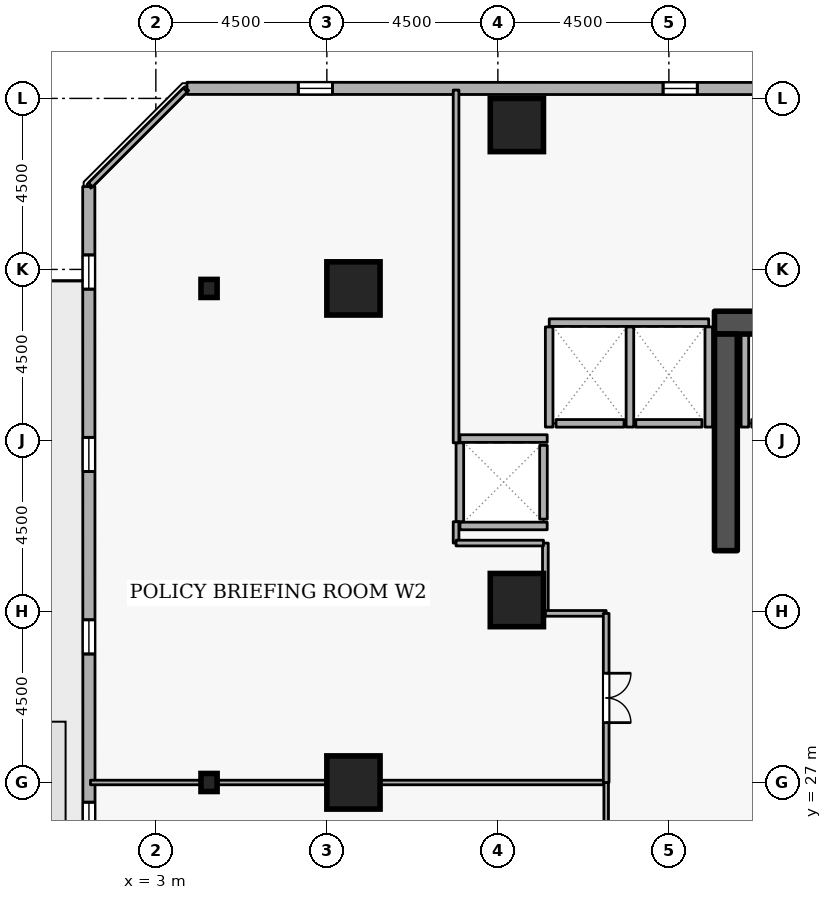
"""IFC4 building model, lengths in metres.
Left out: names, types, materials, properties, quantities, classifications, styles, units other than length and angle.
Written with IfcOpenShell. Run it as: python <this file> out.ifc"""

import sys

from ifc_helpers import new_model, si_unit, direction, frame, frame_2d, origin, origin_2d, place, context, subcontext, project, spatial, rectangle, i_section, extrude, element, fill, save


model = new_model("IFC4")
c1 = context("Model", 3, precision=1e-05, world=origin(), true_north=direction((0.0, 1.0)))
c2 = subcontext(c1, "Body", "Model", "MODEL_VIEW")
j1 = project(units=[si_unit("LENGTHUNIT", "METRE"), si_unit("PLANEANGLEUNIT", "RADIAN")], contexts=[c1])
p1 = place(None, origin())
s1 = spatial("IfcSite", under=j1, at=p1, CompositionType="ELEMENT")
p2 = place(p1, origin())
s2 = spatial("IfcBuilding", under=s1, at=p2, CompositionType="ELEMENT")
p3 = place(p2, frame((0.0, 0.0, 35.1)))
s3 = spatial("IfcBuildingStorey", under=s2, at=p3, CompositionType="ELEMENT", Elevation=35.1)
p4 = place(p3, frame((17.7, 39.1, 0.0), z_axis=(0.0, 0.0, 1.0), x_axis=(1.0, 0.0, 0.0)))
e1 = element("IfcWall", 1, at=p4, inside=s3, PredefinedType="SHEAR", context=c2, shape_type="SweptSolid", body=[
    extrude(rectangle(XDim=15.6, YDim=0.6, at=frame_2d((7.8, 0.0))), origin(), (0.0, 0.0, 1.0), 3.6),
])
p5 = place(p3, frame((18.0, 33.1, 0.0), z_axis=(0.0, 0.0, 1.0), x_axis=(0.0, 1.0, 0.0)))
e2 = element("IfcWall", 2, at=p5, inside=s3, PredefinedType="SHEAR", context=c2, shape_type="SweptSolid", body=[
    extrude(rectangle(XDim=5.7, YDim=0.6, at=frame_2d((2.85, 0.0))), origin(), (0.0, 0.0, 1.0), 3.6),
])
for number, where, z_axis, x_axis in (
    (3, (12.5, 44.3, 0.0), (0.0, 0.0, 1.0), (1.0, 0.0, 0.0)),
    (4, (8.2, 27.0, 0.0), (0.0, 0.0, 1.0), (1.0, 0.0, 0.0)),
    (5, (8.2, 40.0, 0.0), (0.0, 0.0, 1.0), (1.0, 0.0, 0.0)),
    (6, (12.5, 31.8, 0.0), (0.0, 0.0, 1.0), (1.0, 0.0, 0.0)),
):
    element("IfcColumn", number, at=place(p3, frame(where, z_axis=z_axis, x_axis=x_axis)), inside=s3, PredefinedType="COLUMN", context=c2, shape_type="SweptSolid", body=[
        extrude(rectangle(XDim=1.4, YDim=1.4, at=origin_2d()), origin(), (0.0, 0.0, 1.0), 3.6),
    ])
for number, where, z_axis, x_axis in (
    (7, (4.4, 27.0, 0.0), (0.0, 0.0, 1.0), (1.0, 0.0, 0.0)),
    (8, (4.4, 40.0, 0.0), (0.0, 0.0, 1.0), (1.0, 0.0, 0.0)),
):
    element("IfcColumn", number, at=place(p3, frame(where, z_axis=z_axis, x_axis=x_axis)), inside=s3, PredefinedType="COLUMN", context=c2, shape_type="SweptSolid", body=[
        extrude(i_section(OverallWidth=0.424, OverallDepth=0.475, WebThickness=0.048, FlangeThickness=0.077, FilletRadius=0.015, at=origin_2d()), origin(), (0.0, 0.0, 1.0), 3.6),
    ])
p6 = place(p3, frame((38.248, 45.255, 0.0), z_axis=(0.0, 0.0, 1.0), x_axis=(-0.999999961759, 0.000276554545, 0.0)))
e9 = element("IfcWall", 9, at=p6, inside=s3, PredefinedType="STANDARD", context=c2, shape_type="SweptSolid", body=[
    extrude(rectangle(XDim=34.429, YDim=0.32, at=frame_2d((17.214, 0.0))), origin(), (0.0, 0.0, 1.0), 2.7),
])
p7 = place(p6, frame((6.6, 0.0, 0.72)))
e10 = element("IfcOpeningElement", 10, at=p7, cuts=e9, PredefinedType="OPENING", context=c2, shape_type="SweptSolid", body=[
    extrude(rectangle(XDim=0.9, YDim=1.75, at=frame_2d((0.45, 0.875))), frame((0.0, 0.17, 0.0), z_axis=(0.0, -1.0, 0.0), x_axis=(1.0, 0.0, 0.0)), (0.0, 0.0, 1.0), 0.34),
])
p8 = place(p6, frame((16.2, 0.0, 0.72)))
e11 = element("IfcOpeningElement", 11, at=p8, cuts=e9, PredefinedType="OPENING", context=c2, shape_type="SweptSolid", body=[
    extrude(rectangle(XDim=0.9, YDim=1.75, at=frame_2d((0.45, 0.875))), frame((0.0, 0.17, 0.0), z_axis=(0.0, -1.0, 0.0), x_axis=(1.0, 0.0, 0.0)), (0.0, 0.0, 1.0), 0.34),
])
p9 = place(p6, frame((21.0, 0.0, 0.72)))
e12 = element("IfcOpeningElement", 12, at=p9, cuts=e9, PredefinedType="OPENING", context=c2, shape_type="SweptSolid", body=[
    extrude(rectangle(XDim=0.9, YDim=1.75, at=frame_2d((0.45, 0.875))), frame((0.0, 0.17, 0.0), z_axis=(0.0, -1.0, 0.0), x_axis=(1.0, 0.0, 0.0)), (0.0, 0.0, 1.0), 0.34),
])
p10 = place(p6, frame((30.6, 0.0, 0.72)))
e13 = element("IfcOpeningElement", 13, at=p10, cuts=e9, PredefinedType="OPENING", context=c2, shape_type="SweptSolid", body=[
    extrude(rectangle(XDim=0.9, YDim=1.75, at=frame_2d((0.45, 0.875))), frame((0.0, 0.17, 0.0), z_axis=(0.0, -1.0, 0.0), x_axis=(1.0, 0.0, 0.0)), (0.0, 0.0, 1.0), 0.34),
])
p11 = place(p3, frame((1.235, 42.681, 0.0), z_axis=(0.0, 0.0, 1.0), x_axis=(0.000276554545, -0.999999961759, 0.0)))
e14 = element("IfcWall", 14, at=p11, inside=s3, PredefinedType="STANDARD", context=c2, shape_type="SweptSolid", body=[
    extrude(rectangle(XDim=34.429, YDim=0.32, at=frame_2d((17.214, 0.0))), origin(), (0.0, 0.0, 1.0), 2.7),
])
p12 = place(p11, frame((19.014, 0.0, 0.0)))
e15 = element("IfcOpeningElement", 15, at=p12, cuts=e14, PredefinedType="OPENING", context=c2, shape_type="SweptSolid", body=[
    extrude(rectangle(XDim=1.0, YDim=2.08, at=frame_2d((0.5, 1.04))), frame((0.0, 0.17, 0.0), z_axis=(0.0, -1.0, 0.0), x_axis=(1.0, 0.0, 0.0)), (0.0, 0.0, 1.0), 0.34),
])
p13 = place(p11, frame((1.8, 0.0, 0.72)))
e16 = element("IfcOpeningElement", 16, at=p13, cuts=e14, PredefinedType="OPENING", context=c2, shape_type="SweptSolid", body=[
    extrude(rectangle(XDim=0.9, YDim=1.75, at=frame_2d((0.45, 0.875))), frame((0.0, 0.17, 0.0), z_axis=(0.0, -1.0, 0.0), x_axis=(1.0, 0.0, 0.0)), (0.0, 0.0, 1.0), 0.34),
])
p14 = place(p11, frame((6.6, 0.0, 0.72)))
e17 = element("IfcOpeningElement", 17, at=p14, cuts=e14, PredefinedType="OPENING", context=c2, shape_type="SweptSolid", body=[
    extrude(rectangle(XDim=0.9, YDim=1.75, at=frame_2d((0.45, 0.875))), frame((0.0, 0.17, 0.0), z_axis=(0.0, -1.0, 0.0), x_axis=(1.0, 0.0, 0.0)), (0.0, 0.0, 1.0), 0.34),
])
p15 = place(p11, frame((11.4, 0.0, 0.72)))
e18 = element("IfcOpeningElement", 18, at=p15, cuts=e14, PredefinedType="OPENING", context=c2, shape_type="SweptSolid", body=[
    extrude(rectangle(XDim=0.9, YDim=1.75, at=frame_2d((0.45, 0.875))), frame((0.0, 0.17, 0.0), z_axis=(0.0, -1.0, 0.0), x_axis=(1.0, 0.0, 0.0)), (0.0, 0.0, 1.0), 0.34),
])
p16 = place(p11, frame((16.2, 0.0, 0.72)))
e19 = element("IfcOpeningElement", 19, at=p16, cuts=e14, PredefinedType="OPENING", context=c2, shape_type="SweptSolid", body=[
    extrude(rectangle(XDim=0.9, YDim=1.75, at=frame_2d((0.45, 0.875))), frame((0.0, 0.17, 0.0), z_axis=(0.0, -1.0, 0.0), x_axis=(1.0, 0.0, 0.0)), (0.0, 0.0, 1.0), 0.34),
])
p17 = place(p11, frame((21.0, 0.0, 0.72)))
e20 = element("IfcOpeningElement", 20, at=p17, cuts=e14, PredefinedType="OPENING", context=c2, shape_type="SweptSolid", body=[
    extrude(rectangle(XDim=0.9, YDim=1.75, at=frame_2d((0.45, 0.875))), frame((0.0, 0.17, 0.0), z_axis=(0.0, -1.0, 0.0), x_axis=(1.0, 0.0, 0.0)), (0.0, 0.0, 1.0), 0.34),
])
p18 = place(p11, frame((25.8, 0.0, 0.72)))
e21 = element("IfcOpeningElement", 21, at=p18, cuts=e14, PredefinedType="OPENING", context=c2, shape_type="SweptSolid", body=[
    extrude(rectangle(XDim=0.9, YDim=1.75, at=frame_2d((0.45, 0.875))), frame((0.0, 0.17, 0.0), z_axis=(0.0, -1.0, 0.0), x_axis=(1.0, 0.0, 0.0)), (0.0, 0.0, 1.0), 0.34),
])
p19 = place(p3, frame((20.62, 36.45, 0.0), z_axis=(0.0, 0.0, 1.0), x_axis=(-1.0, 0.0, 0.0)))
e22 = element("IfcWall", 22, at=p19, inside=s3, PredefinedType="STANDARD", context=c2, shape_type="SweptSolid", body=[
    extrude(rectangle(XDim=1.94, YDim=0.2, at=frame_2d((0.97, 0.0))), origin(), (0.0, 0.0, 1.0), 3.34),
])
p20 = place(p3, frame((17.37, 36.45, 0.0), z_axis=(0.0, 0.0, 1.0), x_axis=(-1.0, 0.0, 0.0)))
e23 = element("IfcWall", 23, at=p20, inside=s3, PredefinedType="STANDARD", context=c2, shape_type="SweptSolid", body=[
    extrude(rectangle(XDim=1.74, YDim=0.2, at=frame_2d((0.87, 0.0))), origin(), (0.0, 0.0, 1.0), 3.34),
])
p21 = place(p3, frame((15.32, 36.45, 0.0), z_axis=(0.0, 0.0, 1.0), x_axis=(-1.0, 0.0, 0.0)))
e24 = element("IfcWall", 24, at=p21, inside=s3, PredefinedType="STANDARD", context=c2, shape_type="SweptSolid", body=[
    extrude(rectangle(XDim=1.79, YDim=0.2, at=frame_2d((0.895, 0.0))), origin(), (0.0, 0.0, 1.0), 3.34),
])
p22 = place(p3, frame((13.2, 33.93, 0.0), z_axis=(0.0, 0.0, 1.0), x_axis=(0.0, 1.0, 0.0)))
e25 = element("IfcWall", 25, at=p22, inside=s3, PredefinedType="STANDARD", context=c2, shape_type="SweptSolid", body=[
    extrude(rectangle(XDim=1.94, YDim=0.2, at=frame_2d((0.97, 0.0))), origin(), (0.0, 0.0, 1.0), 3.34),
])
p23 = place(p3, frame((18.5, 36.352, 0.0), z_axis=(0.0, 0.0, 1.0), x_axis=(0.0, 1.0, 0.0)))
e26 = element("IfcWall", 26, at=p23, inside=s3, PredefinedType="STANDARD", context=c2, shape_type="SweptSolid", body=[
    extrude(rectangle(XDim=2.436, YDim=0.2, at=frame_2d((1.218, 0.0))), origin(), (0.0, 0.0, 1.0), 3.34),
])
p24 = place(p3, frame((13.352, 39.1, 0.0), z_axis=(0.0, 0.0, 1.0), x_axis=(1.0, 0.0, 0.0)))
e27 = element("IfcWall", 27, at=p24, inside=s3, PredefinedType="STANDARD", context=c2, shape_type="SweptSolid", body=[
    extrude(rectangle(XDim=4.196, YDim=0.2, at=frame_2d((2.098, 0.0))), origin(), (0.0, 0.0, 1.0), 3.34),
])
p25 = place(p3, frame((17.55, 36.352, 0.0), z_axis=(0.0, 0.0, 1.0), x_axis=(0.0, 1.0, 0.0)))
e28 = element("IfcWall", 28, at=p25, inside=s3, PredefinedType="STANDARD", context=c2, shape_type="SweptSolid", body=[
    extrude(rectangle(XDim=2.636, YDim=0.2, at=frame_2d((1.318, 0.0))), origin(), (0.0, 0.0, 1.0), 2.545),
])
for number, where, z_axis, x_axis in (
    (29, (15.475, 36.352, 0.0), (0.0, 0.0, 1.0), (0.0, 1.0, 0.0)),
    (30, (13.35, 36.352, 0.0), (0.0, 0.0, 1.0), (0.0, 1.0, 0.0)),
):
    element("IfcWall", number, at=place(p3, frame(where, z_axis=z_axis, x_axis=x_axis)), inside=s3, PredefinedType="STANDARD", context=c2, shape_type="SweptSolid", body=[
        extrude(rectangle(XDim=2.636, YDim=0.2, at=frame_2d((1.318, 0.0))), origin(), (0.0, 0.0, 1.0), 3.34),
    ])
for number, where, z_axis, x_axis in (
    (31, (11.002, 36.05, 0.0), (0.0, 0.0, 1.0), (1.0, 0.0, 0.0)),
    (32, (11.002, 33.75, 0.0), (0.0, 0.0, 1.0), (1.0, 0.0, 0.0)),
):
    element("IfcWall", number, at=place(p3, frame(where, z_axis=z_axis, x_axis=x_axis)), inside=s3, PredefinedType="STANDARD", context=c2, shape_type="SweptSolid", body=[
        extrude(rectangle(XDim=2.296, YDim=0.2, at=frame_2d((1.148, 0.0))), origin(), (0.0, 0.0, 1.0), 3.34),
    ])
p26 = place(p3, frame((11.0, 33.862, 0.0), z_axis=(0.0, 0.0, 1.0), x_axis=(0.0, 1.0, 0.0)))
e33 = element("IfcWall", 33, at=p26, inside=s3, PredefinedType="STANDARD", context=c2, shape_type="SweptSolid", body=[
    extrude(rectangle(XDim=2.076, YDim=0.2, at=frame_2d((1.038, 0.0))), origin(), (0.0, 0.0, 1.0), 3.34),
])
p27 = place(p3, frame((1.28, 27.0, 0.0), z_axis=(0.0, 0.0, 1.0), x_axis=(1.0, 0.0, 0.0)))
e34 = element("IfcWall", 34, at=p27, inside=s3, PredefinedType="PARTITIONING", context=c2, shape_type="SweptSolid", body=[
    extrude(rectangle(XDim=13.57, YDim=0.12, at=frame_2d((6.785, 0.0))), origin(), (0.0, 0.0, 1.0), 2.878),
])
p28 = place(p3, frame((14.85, 27.0, 0.0), z_axis=(0.0, 0.0, 1.0), x_axis=(0.0, -1.0, 0.0)))
e35 = element("IfcWall", 35, at=p28, inside=s3, PredefinedType="PARTITIONING", context=c2, shape_type="SweptSolid", body=[
    extrude(rectangle(XDim=4.45, YDim=0.12, at=frame_2d((2.225, 0.0))), origin(), (0.0, 0.0, 1.0), 3.34),
])
p29 = place(p3, frame((13.25, 33.3, 0.0), z_axis=(0.0, 0.0, 1.0), x_axis=(0.0, -1.0, 0.0)))
e36 = element("IfcWall", 36, at=p29, inside=s3, PredefinedType="PARTITIONING", context=c2, shape_type="SweptSolid", body=[
    extrude(rectangle(XDim=1.85, YDim=0.15, at=frame_2d((0.925, 0.0))), origin(), (0.0, 0.0, 1.0), 3.34),
])
p30 = place(p3, frame((13.25, 31.45, 0.0), z_axis=(0.0, 0.0, 1.0), x_axis=(1.0, 0.0, 0.0)))
e37 = element("IfcWall", 37, at=p30, inside=s3, PredefinedType="PARTITIONING", context=c2, shape_type="SweptSolid", body=[
    extrude(rectangle(XDim=1.6, YDim=0.15, at=frame_2d((0.8, 0.0))), origin(), (0.0, 0.0, 1.0), 3.34),
])
p31 = place(p3, frame((14.85, 31.45, 0.0), z_axis=(0.0, 0.0, 1.0), x_axis=(0.0, -1.0, 0.0)))
e38 = element("IfcWall", 38, at=p31, inside=s3, PredefinedType="PARTITIONING", context=c2, shape_type="SweptSolid", body=[
    extrude(rectangle(XDim=4.45, YDim=0.15, at=frame_2d((2.225, 0.0))), origin(), (0.0, 0.0, 1.0), 3.34),
])
p32 = place(p31, frame((1.575, 0.0, 0.0)))
e39 = element("IfcOpeningElement", 39, at=p32, cuts=e38, PredefinedType="OPENING", context=c2, shape_type="SweptSolid", body=[
    extrude(rectangle(XDim=1.3, YDim=2.12, at=frame_2d((0.65, 1.06))), frame((0.0, 0.085, 0.0), z_axis=(0.0, -1.0, 0.0), x_axis=(1.0, 0.0, 0.0)), (0.0, 0.0, 1.0), 0.17),
])
p33 = place(p3, frame((1.28, 42.725, 0.0), z_axis=(0.0, 0.0, 1.0), x_axis=(0.707106781187, 0.707106781187, 0.0)))
e40 = element("IfcWall", 40, at=p33, inside=s3, PredefinedType="PARTITIONING", context=c2, shape_type="SweptSolid", body=[
    extrude(rectangle(XDim=3.528, YDim=0.15, at=frame_2d((1.764, 0.0))), origin(), (0.0, 0.0, 1.0), 3.34),
])
p34 = place(p3, frame((10.9, 45.22, 0.0), z_axis=(0.0, 0.0, 1.0), x_axis=(0.0, -1.0, 0.0)))
e41 = element("IfcWall", 41, at=p34, inside=s3, PredefinedType="PARTITIONING", context=c2, shape_type="SweptSolid", body=[
    extrude(rectangle(XDim=9.282, YDim=0.15, at=frame_2d((4.641, 0.0))), origin(), (0.0, 0.0, 1.0), 3.34),
])
p35 = place(p3, frame((10.9, 33.862, 0.0), z_axis=(0.0, 0.0, 1.0), x_axis=(0.0, -1.0, 0.0)))
e42 = element("IfcWall", 42, at=p35, inside=s3, PredefinedType="PARTITIONING", context=c2, shape_type="SweptSolid", body=[
    extrude(rectangle(XDim=0.562, YDim=0.15, at=frame_2d((0.281, 0.0))), origin(), (0.0, 0.0, 1.0), 3.34),
])
p36 = place(p3, frame((10.9, 33.3, 0.0), z_axis=(0.0, 0.0, 1.0), x_axis=(1.0, 0.0, 0.0)))
e43 = element("IfcWall", 43, at=p36, inside=s3, PredefinedType="PARTITIONING", context=c2, shape_type="SweptSolid", body=[
    extrude(rectangle(XDim=2.3, YDim=0.15, at=frame_2d((1.15, 0.0))), origin(), (0.0, 0.0, 1.0), 3.34),
])
p37 = place(p9, origin())
e44 = element("IfcWindow", 44, at=p37, inside=s3, PartitioningType="SINGLE_PANEL", PredefinedType="WINDOW", context=c2, shape_type="SweptSolid", body=[
    extrude(rectangle(XDim=0.9, YDim=1.75, at=frame_2d((0.45, 0.875))), frame((0.0, 0.03, 0.0), z_axis=(0.0, -1.0, 0.0), x_axis=(1.0, 0.0, 0.0)), (0.0, 0.0, 1.0), 0.06),
])
fill(e12, e44)
p38 = place(p10, origin())
e45 = element("IfcWindow", 45, at=p38, inside=s3, PartitioningType="SINGLE_PANEL", PredefinedType="WINDOW", context=c2, shape_type="SweptSolid", body=[
    extrude(rectangle(XDim=0.9, YDim=1.75, at=frame_2d((0.45, 0.875))), frame((0.0, 0.03, 0.0), z_axis=(0.0, -1.0, 0.0), x_axis=(1.0, 0.0, 0.0)), (0.0, 0.0, 1.0), 0.06),
])
fill(e13, e45)
p39 = place(p13, origin())
e46 = element("IfcWindow", 46, at=p39, inside=s3, PartitioningType="SINGLE_PANEL", PredefinedType="WINDOW", context=c2, shape_type="SweptSolid", body=[
    extrude(rectangle(XDim=0.9, YDim=1.75, at=frame_2d((0.45, 0.875))), frame((0.0, 0.03, 0.0), z_axis=(0.0, -1.0, 0.0), x_axis=(1.0, 0.0, 0.0)), (0.0, 0.0, 1.0), 0.06),
])
fill(e16, e46)
p40 = place(p14, origin())
e47 = element("IfcWindow", 47, at=p40, inside=s3, PartitioningType="SINGLE_PANEL", PredefinedType="WINDOW", context=c2, shape_type="SweptSolid", body=[
    extrude(rectangle(XDim=0.9, YDim=1.75, at=frame_2d((0.45, 0.875))), frame((0.0, 0.03, 0.0), z_axis=(0.0, -1.0, 0.0), x_axis=(1.0, 0.0, 0.0)), (0.0, 0.0, 1.0), 0.06),
])
fill(e17, e47)
p41 = place(p15, origin())
e48 = element("IfcWindow", 48, at=p41, inside=s3, PartitioningType="SINGLE_PANEL", PredefinedType="WINDOW", context=c2, shape_type="SweptSolid", body=[
    extrude(rectangle(XDim=0.9, YDim=1.75, at=frame_2d((0.45, 0.875))), frame((0.0, 0.03, 0.0), z_axis=(0.0, -1.0, 0.0), x_axis=(1.0, 0.0, 0.0)), (0.0, 0.0, 1.0), 0.06),
])
fill(e18, e48)
p42 = place(p16, origin())
e49 = element("IfcWindow", 49, at=p42, inside=s3, PartitioningType="SINGLE_PANEL", PredefinedType="WINDOW", context=c2, shape_type="SweptSolid", body=[
    extrude(rectangle(XDim=0.9, YDim=1.75, at=frame_2d((0.45, 0.875))), frame((0.0, 0.03, 0.0), z_axis=(0.0, -1.0, 0.0), x_axis=(1.0, 0.0, 0.0)), (0.0, 0.0, 1.0), 0.06),
])
fill(e19, e49)
p43 = place(p32, origin())
e50 = element("IfcDoor", 50, at=p43, inside=s3, OperationType="DOUBLE_DOOR_SINGLE_SWING", PredefinedType="DOOR", context=c2, shape_type="SweptSolid", body=[
    extrude(rectangle(XDim=1.3, YDim=2.12, at=frame_2d((0.65, 1.06))), frame((0.0, 0.025, 0.0), z_axis=(0.0, -1.0, 0.0), x_axis=(1.0, 0.0, 0.0)), (0.0, 0.0, 1.0), 0.05),
])
fill(e39, e50)
save(model, sys.argv[1])
